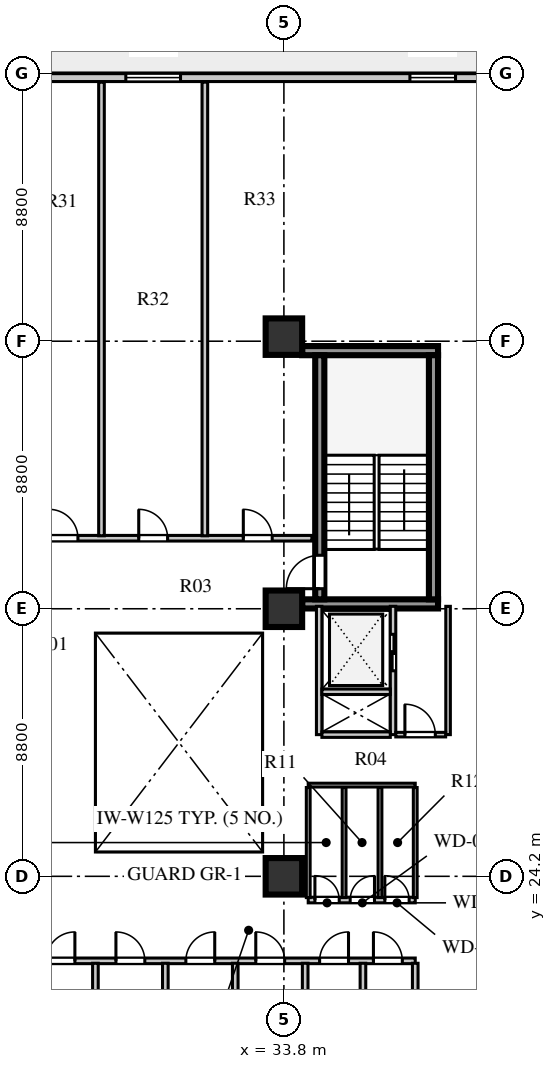
"""IFC4 building model, lengths in metres.
Left out: names, types, materials, properties, quantities, classifications, styles, units other than length and angle.
Written with IfcOpenShell. Run it as: python <this file> out.ifc"""

import sys

from ifc_helpers import new_model, si_unit, direction, frame, frame_2d, origin, origin_2d, place, context, subcontext, project, spatial, rectangle, extrude, element, fill, save


model = new_model("IFC4")
c1 = context("Model", 3, precision=1e-05, world=origin(), true_north=direction((0.0, 1.0)))
c2 = subcontext(c1, "Body", "Model", "MODEL_VIEW")
j1 = project(units=[si_unit("LENGTHUNIT", "METRE"), si_unit("PLANEANGLEUNIT", "RADIAN")], contexts=[c1])
p1 = place(None, origin())
s1 = spatial("IfcSite", under=j1, at=p1, CompositionType="ELEMENT")
p2 = place(p1, origin())
s2 = spatial("IfcBuilding", under=s1, at=p2, CompositionType="ELEMENT")
p3 = place(p2, frame((0.0, 0.0, 74.0)))
s3 = spatial("IfcBuildingStorey", under=s2, at=p3, CompositionType="ELEMENT", Elevation=74.0)
for number, where, z_axis, x_axis in (
    (1, (34.4, 33.16, 0.0), (0.0, 0.0, 1.0), (1.0, 0.0, 0.0)),
    (2, (34.4, 41.49, 0.0), (0.0, 0.0, 1.0), (1.0, 0.0, 0.0)),
):
    element("IfcWall", number, at=place(p3, frame(where, z_axis=z_axis, x_axis=x_axis)), inside=s3, PredefinedType="SHEAR", context=c2, shape_type="SweptSolid", body=[
        extrude(rectangle(XDim=4.47, YDim=0.3, at=frame_2d((2.235, 0.0))), origin(), (0.0, 0.0, 1.0), 3.72),
    ])
p4 = place(p3, frame((34.98, 33.31, 0.0), z_axis=(0.0, 0.0, 1.0), x_axis=(0.0, 1.0, 0.0)))
e3 = element("IfcWall", 3, at=p4, inside=s3, PredefinedType="SHEAR", context=c2, shape_type="SweptSolid", body=[
    extrude(rectangle(XDim=8.03, YDim=0.3, at=frame_2d((4.015, 0.0))), origin(), (0.0, 0.0, 1.0), 3.72),
])
p5 = place(p4, frame((0.35, 0.0, 0.0)))
e4 = element("IfcOpeningElement", 4, at=p5, cuts=e3, PredefinedType="OPENING", context=c2, shape_type="SweptSolid", body=[
    extrude(rectangle(XDim=1.1, YDim=2.1, at=frame_2d((0.55, 1.05))), frame((0.0, 0.16, 0.0), z_axis=(0.0, -1.0, 0.0), x_axis=(1.0, 0.0, 0.0)), (0.0, 0.0, 1.0), 0.32),
])
p6 = place(p3, frame((38.72, 33.31, 0.0), z_axis=(0.0, 0.0, 1.0), x_axis=(0.0, 1.0, 0.0)))
e5 = element("IfcWall", 5, at=p6, inside=s3, PredefinedType="SHEAR", context=c2, shape_type="SweptSolid", body=[
    extrude(rectangle(XDim=8.03, YDim=0.3, at=frame_2d((4.015, 0.0))), origin(), (0.0, 0.0, 1.0), 3.72),
])
for number, where, z_axis, x_axis in (
    (6, (33.8, 24.2, 0.0), (0.0, 0.0, 1.0), (1.0, 0.0, 0.0)),
    (7, (33.8, 33.0, 0.0), (0.0, 0.0, 1.0), (1.0, 0.0, 0.0)),
    (8, (33.8, 41.95, 0.0), (0.0, 0.0, 1.0), (1.0, 0.0, 0.0)),
):
    element("IfcColumn", number, at=place(p3, frame(where, z_axis=z_axis, x_axis=x_axis)), inside=s3, PredefinedType="COLUMN", context=c2, shape_type="SweptSolid", body=[
        extrude(rectangle(XDim=1.2, YDim=1.2, at=origin_2d()), origin(), (0.0, 0.0, 1.0), 3.72),
    ])
p7 = place(p3, frame((46.3, 50.47, 0.0), z_axis=(0.0, 0.0, 1.0), x_axis=(-1.0, 0.0, 0.0)))
e9 = element("IfcWall", 9, at=p7, inside=s3, PredefinedType="SOLIDWALL", context=c2, shape_type="SweptSolid", body=[
    extrude(rectangle(XDim=34.0, YDim=0.26, at=frame_2d((17.0, 0.0))), origin(), (0.0, 0.0, 1.0), 3.72),
])
p8 = place(p7, frame((32.05, 0.0, 0.0)))
e10 = element("IfcOpeningElement", 10, at=p8, cuts=e9, PredefinedType="OPENING", context=c2, shape_type="SweptSolid", body=[
    extrude(rectangle(XDim=1.0, YDim=2.05, at=frame_2d((0.5, 1.025))), frame((0.0, 0.14, 0.0), z_axis=(0.0, -1.0, 0.0), x_axis=(1.0, 0.0, 0.0)), (0.0, 0.0, 1.0), 0.28),
])
p9 = place(p7, frame((24.295, 0.0, 0.8)))
e11 = element("IfcOpeningElement", 11, at=p9, cuts=e9, PredefinedType="OPENING", context=c2, shape_type="SweptSolid", body=[
    extrude(rectangle(XDim=2.25, YDim=2.0, at=frame_2d((1.125, 1.0))), frame((0.0, 0.14, 0.0), z_axis=(0.0, -1.0, 0.0), x_axis=(1.0, 0.0, 0.0)), (0.0, 0.0, 1.0), 0.28),
])
p10 = place(p7, frame((15.9, 0.0, 0.8)))
e12 = element("IfcOpeningElement", 12, at=p10, cuts=e9, PredefinedType="OPENING", context=c2, shape_type="SweptSolid", body=[
    extrude(rectangle(XDim=1.8, YDim=2.0, at=frame_2d((0.9, 1.0))), frame((0.0, 0.14, 0.0), z_axis=(0.0, -1.0, 0.0), x_axis=(1.0, 0.0, 0.0)), (0.0, 0.0, 1.0), 0.28),
])
p11 = place(p7, frame((6.855, 0.0, 0.8)))
e13 = element("IfcOpeningElement", 13, at=p11, cuts=e9, PredefinedType="OPENING", context=c2, shape_type="SweptSolid", body=[
    extrude(rectangle(XDim=1.5, YDim=2.0, at=frame_2d((0.75, 1.0))), frame((0.0, 0.14, 0.0), z_axis=(0.0, -1.0, 0.0), x_axis=(1.0, 0.0, 0.0)), (0.0, 0.0, 1.0), 0.28),
])
p12 = place(p3, frame((34.96, 28.86, 0.0), z_axis=(0.0, 0.0, 1.0), x_axis=(0.0, 1.0, 0.0)))
e14 = element("IfcWall", 14, at=p12, inside=s3, PredefinedType="SOLIDWALL", context=c2, shape_type="SweptSolid", body=[
    extrude(rectangle(XDim=4.22, YDim=0.18, at=frame_2d((2.11, 0.0))), origin(), (0.0, 0.0, 1.0), 3.72),
])
p13 = place(p3, frame((37.39, 28.86, 0.0), z_axis=(0.0, 0.0, 1.0), x_axis=(0.0, 1.0, 0.0)))
e15 = element("IfcWall", 15, at=p13, inside=s3, PredefinedType="SOLIDWALL", context=c2, shape_type="SweptSolid", body=[
    extrude(rectangle(XDim=4.22, YDim=0.18, at=frame_2d((2.11, 0.0))), origin(), (0.0, 0.0, 1.0), 3.72),
])
p14 = place(p13, frame((2.1, 0.0, 0.0)))
e16 = element("IfcOpeningElement", 16, at=p14, cuts=e15, PredefinedType="OPENING", context=c2, shape_type="SweptSolid", body=[
    extrude(rectangle(XDim=1.2, YDim=2.12, at=frame_2d((0.6, 1.06))), frame((0.0, 0.1, 0.0), z_axis=(0.0, -1.0, 0.0), x_axis=(1.0, 0.0, 0.0)), (0.0, 0.0, 1.0), 0.2),
])
for number, where, z_axis, x_axis in (
    (17, (35.05, 28.86, 0.0), (0.0, 0.0, 1.0), (1.0, 0.0, 0.0)),
    (18, (35.05, 30.27, 0.0), (0.0, 0.0, 1.0), (1.0, 0.0, 0.0)),
):
    element("IfcWall", number, at=place(p3, frame(where, z_axis=z_axis, x_axis=x_axis)), inside=s3, PredefinedType="SOLIDWALL", context=c2, shape_type="SweptSolid", body=[
        extrude(rectangle(XDim=2.25, YDim=0.18, at=frame_2d((1.125, 0.0))), origin(), (0.0, 0.0, 1.0), 3.72),
    ])
p15 = place(p3, frame((39.2, 28.86, 0.0), z_axis=(0.0, 0.0, 1.0), x_axis=(0.0, 1.0, 0.0)))
e19 = element("IfcWall", 19, at=p15, inside=s3, PredefinedType="PARTITIONING", context=c2, shape_type="SweptSolid", body=[
    extrude(rectangle(XDim=4.22, YDim=0.15, at=frame_2d((2.11, 0.0))), origin(), (0.0, 0.0, 1.0), 3.72),
])
p16 = place(p3, frame((37.48, 28.86, 0.0), z_axis=(0.0, 0.0, 1.0), x_axis=(1.0, 0.0, 0.0)))
e20 = element("IfcWall", 20, at=p16, inside=s3, PredefinedType="PARTITIONING", context=c2, shape_type="SweptSolid", body=[
    extrude(rectangle(XDim=1.64, YDim=0.15, at=frame_2d((0.82, 0.0))), origin(), (0.0, 0.0, 1.0), 3.72),
])
p17 = place(p16, frame((0.3, 0.0, 0.0)))
e21 = element("IfcOpeningElement", 21, at=p17, cuts=e20, PredefinedType="OPENING", context=c2, shape_type="SweptSolid", body=[
    extrude(rectangle(XDim=1.0, YDim=2.1, at=frame_2d((0.5, 1.05))), frame((0.0, 0.085, 0.0), z_axis=(0.0, -1.0, 0.0), x_axis=(1.0, 0.0, 0.0)), (0.0, 0.0, 1.0), 0.17),
])
p18 = place(p3, frame((25.25, 21.42, 0.0), z_axis=(0.0, 0.0, 1.0), x_axis=(1.0, 0.0, 0.0)))
e22 = element("IfcWall", 22, at=p18, inside=s3, PredefinedType="SOLIDWALL", context=c2, shape_type="SweptSolid", body=[
    extrude(rectangle(XDim=12.87, YDim=0.185, at=frame_2d((6.435, 0.0))), origin(), (0.0, 0.0, 1.0), 3.32),
])
p19 = place(p18, frame((0.725, 0.0, 0.0)))
e23 = element("IfcOpeningElement", 23, at=p19, cuts=e22, PredefinedType="OPENING", context=c2, shape_type="SweptSolid", body=[
    extrude(rectangle(XDim=0.95, YDim=2.08, at=frame_2d((0.475, 1.04))), frame((0.0, 0.103, 0.0), z_axis=(0.0, -1.0, 0.0), x_axis=(1.0, 0.0, 0.0)), (0.0, 0.0, 1.0), 0.205),
])
p20 = place(p18, frame((3.025, 0.0, 0.0)))
e24 = element("IfcOpeningElement", 24, at=p20, cuts=e22, PredefinedType="OPENING", context=c2, shape_type="SweptSolid", body=[
    extrude(rectangle(XDim=0.95, YDim=2.08, at=frame_2d((0.475, 1.04))), frame((0.0, 0.103, 0.0), z_axis=(0.0, -1.0, 0.0), x_axis=(1.0, 0.0, 0.0)), (0.0, 0.0, 1.0), 0.205),
])
p21 = place(p18, frame((5.325, 0.0, 0.0)))
e25 = element("IfcOpeningElement", 25, at=p21, cuts=e22, PredefinedType="OPENING", context=c2, shape_type="SweptSolid", body=[
    extrude(rectangle(XDim=0.95, YDim=2.08, at=frame_2d((0.475, 1.04))), frame((0.0, 0.103, 0.0), z_axis=(0.0, -1.0, 0.0), x_axis=(1.0, 0.0, 0.0)), (0.0, 0.0, 1.0), 0.205),
])
p22 = place(p18, frame((7.625, 0.0, 0.0)))
e26 = element("IfcOpeningElement", 26, at=p22, cuts=e22, PredefinedType="OPENING", context=c2, shape_type="SweptSolid", body=[
    extrude(rectangle(XDim=0.95, YDim=2.08, at=frame_2d((0.475, 1.04))), frame((0.0, 0.103, 0.0), z_axis=(0.0, -1.0, 0.0), x_axis=(1.0, 0.0, 0.0)), (0.0, 0.0, 1.0), 0.205),
])
p23 = place(p18, frame((9.725, 0.0, 0.0)))
e27 = element("IfcOpeningElement", 27, at=p23, cuts=e22, PredefinedType="OPENING", context=c2, shape_type="SweptSolid", body=[
    extrude(rectangle(XDim=0.95, YDim=2.08, at=frame_2d((0.475, 1.04))), frame((0.0, 0.103, 0.0), z_axis=(0.0, -1.0, 0.0), x_axis=(1.0, 0.0, 0.0)), (0.0, 0.0, 1.0), 0.205),
])
p24 = place(p18, frame((11.495, 0.0, 0.0)))
e28 = element("IfcOpeningElement", 28, at=p24, cuts=e22, PredefinedType="OPENING", context=c2, shape_type="SweptSolid", body=[
    extrude(rectangle(XDim=0.95, YDim=2.08, at=frame_2d((0.475, 1.04))), frame((0.0, 0.103, 0.0), z_axis=(0.0, -1.0, 0.0), x_axis=(1.0, 0.0, 0.0)), (0.0, 0.0, 1.0), 0.205),
])
p25 = place(p3, frame((38.12, 6.88, 0.0), z_axis=(0.0, 0.0, 1.0), x_axis=(0.0, 1.0, 0.0)))
e29 = element("IfcWall", 29, at=p25, inside=s3, PredefinedType="SOLIDWALL", context=c2, shape_type="SweptSolid", body=[
    extrude(rectangle(XDim=14.46, YDim=0.185, at=frame_2d((7.23, 0.0))), origin(), (0.0, 0.0, 1.0), 3.72),
])
p26 = place(p3, frame((34.6, 23.42, 0.0), z_axis=(0.0, 0.0, 1.0), x_axis=(1.0, 0.0, 0.0)))
e30 = element("IfcWall", 30, at=p26, inside=s3, PredefinedType="SOLIDWALL", context=c2, shape_type="SweptSolid", body=[
    extrude(rectangle(XDim=3.52, YDim=0.185, at=frame_2d((1.76, 0.0))), origin(), (0.0, 0.0, 1.0), 3.72),
])
p27 = place(p26, frame((0.22, 0.0, 0.0)))
e31 = element("IfcOpeningElement", 31, at=p27, cuts=e30, PredefinedType="OPENING", context=c2, shape_type="SweptSolid", body=[
    extrude(rectangle(XDim=0.8, YDim=2.05, at=frame_2d((0.4, 1.025))), frame((0.0, 0.103, 0.0), z_axis=(0.0, -1.0, 0.0), x_axis=(1.0, 0.0, 0.0)), (0.0, 0.0, 1.0), 0.205),
])
p28 = place(p26, frame((1.38, 0.0, 0.0)))
e32 = element("IfcOpeningElement", 32, at=p28, cuts=e30, PredefinedType="OPENING", context=c2, shape_type="SweptSolid", body=[
    extrude(rectangle(XDim=0.8, YDim=2.05, at=frame_2d((0.4, 1.025))), frame((0.0, 0.103, 0.0), z_axis=(0.0, -1.0, 0.0), x_axis=(1.0, 0.0, 0.0)), (0.0, 0.0, 1.0), 0.205),
])
p29 = place(p26, frame((2.52, 0.0, 0.0)))
e33 = element("IfcOpeningElement", 33, at=p29, cuts=e30, PredefinedType="OPENING", context=c2, shape_type="SweptSolid", body=[
    extrude(rectangle(XDim=0.8, YDim=2.05, at=frame_2d((0.4, 1.025))), frame((0.0, 0.103, 0.0), z_axis=(0.0, -1.0, 0.0), x_axis=(1.0, 0.0, 0.0)), (0.0, 0.0, 1.0), 0.205),
])
p30 = place(p3, frame((25.25, 35.32, 0.0), z_axis=(0.0, 0.0, 1.0), x_axis=(1.0, 0.0, 0.0)))
e34 = element("IfcWall", 34, at=p30, inside=s3, PredefinedType="SOLIDWALL", context=c2, shape_type="SweptSolid", body=[
    extrude(rectangle(XDim=9.47, YDim=0.185, at=frame_2d((4.735, 0.0))), origin(), (0.0, 0.0, 1.0), 3.72),
])
p31 = place(p30, frame((0.825, 0.0, 0.0)))
e35 = element("IfcOpeningElement", 35, at=p31, cuts=e34, PredefinedType="OPENING", context=c2, shape_type="SweptSolid", body=[
    extrude(rectangle(XDim=0.95, YDim=2.08, at=frame_2d((0.475, 1.04))), frame((0.0, 0.103, 0.0), z_axis=(0.0, -1.0, 0.0), x_axis=(1.0, 0.0, 0.0)), (0.0, 0.0, 1.0), 0.205),
])
p32 = place(p30, frame((3.775, 0.0, 0.0)))
e36 = element("IfcOpeningElement", 36, at=p32, cuts=e34, PredefinedType="OPENING", context=c2, shape_type="SweptSolid", body=[
    extrude(rectangle(XDim=0.95, YDim=2.08, at=frame_2d((0.475, 1.04))), frame((0.0, 0.103, 0.0), z_axis=(0.0, -1.0, 0.0), x_axis=(1.0, 0.0, 0.0)), (0.0, 0.0, 1.0), 0.205),
])
p33 = place(p30, frame((7.215, 0.0, 0.0)))
e37 = element("IfcOpeningElement", 37, at=p33, cuts=e34, PredefinedType="OPENING", context=c2, shape_type="SweptSolid", body=[
    extrude(rectangle(XDim=0.95, YDim=2.08, at=frame_2d((0.475, 1.04))), frame((0.0, 0.103, 0.0), z_axis=(0.0, -1.0, 0.0), x_axis=(1.0, 0.0, 0.0)), (0.0, 0.0, 1.0), 0.205),
])
p34 = place(p3, frame((34.6, 27.2, 0.0), z_axis=(0.0, 0.0, 1.0), x_axis=(1.0, 0.0, 0.0)))
e38 = element("IfcWall", 38, at=p34, inside=s3, PredefinedType="PLUMBINGWALL", context=c2, shape_type="SweptSolid", body=[
    extrude(rectangle(XDim=3.52, YDim=0.125, at=frame_2d((1.76, 0.0))), origin(), (0.0, 0.0, 1.0), 3.32),
])
for number, where, z_axis, x_axis in (
    (39, (34.6, 23.5, 0.0), (0.0, 0.0, 1.0), (0.0, 1.0, 0.0)),
    (40, (38.12, 23.5, 0.0), (0.0, 0.0, 1.0), (0.0, 1.0, 0.0)),
    (41, (35.78, 23.5, 0.0), (0.0, 0.0, 1.0), (0.0, 1.0, 0.0)),
    (42, (36.96, 23.5, 0.0), (0.0, 0.0, 1.0), (0.0, 1.0, 0.0)),
):
    element("IfcWall", number, at=place(p3, frame(where, z_axis=z_axis, x_axis=x_axis)), inside=s3, PredefinedType="PLUMBINGWALL", context=c2, shape_type="SweptSolid", body=[
        extrude(rectangle(XDim=3.62, YDim=0.125, at=frame_2d((1.81, 0.0))), origin(), (0.0, 0.0, 1.0), 3.72),
    ])
for number, where, z_axis, x_axis in (
    (43, (27.6, 6.88, 0.0), (0.0, 0.0, 1.0), (0.0, 1.0, 0.0)),
    (44, (29.9, 6.88, 0.0), (0.0, 0.0, 1.0), (0.0, 1.0, 0.0)),
    (45, (32.2, 6.88, 0.0), (0.0, 0.0, 1.0), (0.0, 1.0, 0.0)),
    (46, (34.5, 6.88, 0.0), (0.0, 0.0, 1.0), (0.0, 1.0, 0.0)),
    (47, (36.4, 6.88, 0.0), (0.0, 0.0, 1.0), (0.0, 1.0, 0.0)),
):
    element("IfcWall", number, at=place(p3, frame(where, z_axis=z_axis, x_axis=x_axis)), inside=s3, PredefinedType="SOLIDWALL", context=c2, shape_type="SweptSolid", body=[
        extrude(rectangle(XDim=14.46, YDim=0.185, at=frame_2d((7.23, 0.0))), origin(), (0.0, 0.0, 1.0), 3.72),
    ])
for number, where, z_axis, x_axis in (
    (48, (27.8, 35.4, 0.0), (0.0, 0.0, 1.0), (0.0, 1.0, 0.0)),
    (49, (31.2, 35.4, 0.0), (0.0, 0.0, 1.0), (0.0, 1.0, 0.0)),
):
    element("IfcWall", number, at=place(p3, frame(where, z_axis=z_axis, x_axis=x_axis)), inside=s3, PredefinedType="SOLIDWALL", context=c2, shape_type="SweptSolid", body=[
        extrude(rectangle(XDim=14.92, YDim=0.185, at=frame_2d((7.46, 0.0))), origin(), (0.0, 0.0, 1.0), 3.72),
    ])
p35 = place(p10, origin())
e50 = element("IfcWindow", 50, at=p35, inside=s3, PartitioningType="SINGLE_PANEL", PredefinedType="WINDOW", context=c2, shape_type="SweptSolid", body=[
    extrude(rectangle(XDim=1.8, YDim=2.0, at=frame_2d((0.9, 1.0))), frame((0.0, 0.03, 0.0), z_axis=(0.0, -1.0, 0.0), x_axis=(1.0, 0.0, 0.0)), (0.0, 0.0, 1.0), 0.06),
])
fill(e12, e50)
p36 = place(p11, origin())
e51 = element("IfcWindow", 51, at=p36, inside=s3, PartitioningType="SINGLE_PANEL", PredefinedType="WINDOW", context=c2, shape_type="SweptSolid", body=[
    extrude(rectangle(XDim=1.5, YDim=2.0, at=frame_2d((0.75, 1.0))), frame((0.0, 0.03, 0.0), z_axis=(0.0, -1.0, 0.0), x_axis=(1.0, 0.0, 0.0)), (0.0, 0.0, 1.0), 0.06),
])
fill(e13, e51)
p37 = place(p5, origin())
e52 = element("IfcDoor", 52, at=p37, inside=s3, OperationType="SINGLE_SWING_LEFT", PredefinedType="DOOR", context=c2, shape_type="SweptSolid", body=[
    extrude(rectangle(XDim=1.1, YDim=2.1, at=frame_2d((0.55, 1.05))), frame((0.0, 0.025, 0.0), z_axis=(0.0, -1.0, 0.0), x_axis=(1.0, 0.0, 0.0)), (0.0, 0.0, 1.0), 0.05),
])
fill(e4, e52)
p38 = place(p14, frame((1.2, 0.0, 0.0), z_axis=(0.0, 0.0, 1.0), x_axis=(-1.0, 0.0, 0.0)))
e53 = element("IfcDoor", 53, at=p38, inside=s3, OperationType="DOUBLE_DOOR_SLIDING", PredefinedType="DOOR", context=c2, shape_type="SweptSolid", body=[
    extrude(rectangle(XDim=1.2, YDim=2.12, at=frame_2d((0.6, 1.06))), frame((0.0, 0.025, 0.0), z_axis=(0.0, -1.0, 0.0), x_axis=(1.0, 0.0, 0.0)), (0.0, 0.0, 1.0), 0.05),
])
fill(e16, e53)
p39 = place(p17, origin())
e54 = element("IfcDoor", 54, at=p39, inside=s3, OperationType="SINGLE_SWING_LEFT", PredefinedType="DOOR", context=c2, shape_type="SweptSolid", body=[
    extrude(rectangle(XDim=1.0, YDim=2.1, at=frame_2d((0.5, 1.05))), frame((0.0, 0.025, 0.0), z_axis=(0.0, -1.0, 0.0), x_axis=(1.0, 0.0, 0.0)), (0.0, 0.0, 1.0), 0.05),
])
fill(e21, e54)
p40 = place(p27, origin())
e55 = element("IfcDoor", 55, at=p40, inside=s3, OperationType="SINGLE_SWING_LEFT", PredefinedType="DOOR", context=c2, shape_type="SweptSolid", body=[
    extrude(rectangle(XDim=0.8, YDim=2.05, at=frame_2d((0.4, 1.025))), frame((0.0, 0.025, 0.0), z_axis=(0.0, -1.0, 0.0), x_axis=(1.0, 0.0, 0.0)), (0.0, 0.0, 1.0), 0.05),
])
fill(e31, e55)
p41 = place(p28, origin())
e56 = element("IfcDoor", 56, at=p41, inside=s3, OperationType="SINGLE_SWING_RIGHT", PredefinedType="DOOR", context=c2, shape_type="SweptSolid", body=[
    extrude(rectangle(XDim=0.8, YDim=2.05, at=frame_2d((0.4, 1.025))), frame((0.0, 0.025, 0.0), z_axis=(0.0, -1.0, 0.0), x_axis=(1.0, 0.0, 0.0)), (0.0, 0.0, 1.0), 0.05),
])
fill(e32, e56)
p42 = place(p29, origin())
e57 = element("IfcDoor", 57, at=p42, inside=s3, OperationType="SINGLE_SWING_LEFT", PredefinedType="DOOR", context=c2, shape_type="SweptSolid", body=[
    extrude(rectangle(XDim=0.8, YDim=2.05, at=frame_2d((0.4, 1.025))), frame((0.0, 0.025, 0.0), z_axis=(0.0, -1.0, 0.0), x_axis=(1.0, 0.0, 0.0)), (0.0, 0.0, 1.0), 0.05),
])
fill(e33, e57)
p43 = place(p19, frame((0.95, 0.0, 0.0), z_axis=(0.0, 0.0, 1.0), x_axis=(-1.0, 0.0, 0.0)))
e58 = element("IfcDoor", 58, at=p43, inside=s3, OperationType="SINGLE_SWING_LEFT", PredefinedType="DOOR", context=c2, shape_type="SweptSolid", body=[
    extrude(rectangle(XDim=0.95, YDim=2.08, at=frame_2d((0.475, 1.04))), frame((0.0, 0.025, 0.0), z_axis=(0.0, -1.0, 0.0), x_axis=(1.0, 0.0, 0.0)), (0.0, 0.0, 1.0), 0.05),
])
fill(e23, e58)
p44 = place(p20, frame((0.95, 0.0, 0.0), z_axis=(0.0, 0.0, 1.0), x_axis=(-1.0, 0.0, 0.0)))
e59 = element("IfcDoor", 59, at=p44, inside=s3, OperationType="SINGLE_SWING_RIGHT", PredefinedType="DOOR", context=c2, shape_type="SweptSolid", body=[
    extrude(rectangle(XDim=0.95, YDim=2.08, at=frame_2d((0.475, 1.04))), frame((0.0, 0.025, 0.0), z_axis=(0.0, -1.0, 0.0), x_axis=(1.0, 0.0, 0.0)), (0.0, 0.0, 1.0), 0.05),
])
fill(e24, e59)
p45 = place(p21, frame((0.95, 0.0, 0.0), z_axis=(0.0, 0.0, 1.0), x_axis=(-1.0, 0.0, 0.0)))
e60 = element("IfcDoor", 60, at=p45, inside=s3, OperationType="SINGLE_SWING_LEFT", PredefinedType="DOOR", context=c2, shape_type="SweptSolid", body=[
    extrude(rectangle(XDim=0.95, YDim=2.08, at=frame_2d((0.475, 1.04))), frame((0.0, 0.025, 0.0), z_axis=(0.0, -1.0, 0.0), x_axis=(1.0, 0.0, 0.0)), (0.0, 0.0, 1.0), 0.05),
])
fill(e25, e60)
p46 = place(p22, frame((0.95, 0.0, 0.0), z_axis=(0.0, 0.0, 1.0), x_axis=(-1.0, 0.0, 0.0)))
e61 = element("IfcDoor", 61, at=p46, inside=s3, OperationType="SINGLE_SWING_RIGHT", PredefinedType="DOOR", context=c2, shape_type="SweptSolid", body=[
    extrude(rectangle(XDim=0.95, YDim=2.08, at=frame_2d((0.475, 1.04))), frame((0.0, 0.025, 0.0), z_axis=(0.0, -1.0, 0.0), x_axis=(1.0, 0.0, 0.0)), (0.0, 0.0, 1.0), 0.05),
])
fill(e26, e61)
p47 = place(p23, frame((0.95, 0.0, 0.0), z_axis=(0.0, 0.0, 1.0), x_axis=(-1.0, 0.0, 0.0)))
e62 = element("IfcDoor", 62, at=p47, inside=s3, OperationType="SINGLE_SWING_LEFT", PredefinedType="DOOR", context=c2, shape_type="SweptSolid", body=[
    extrude(rectangle(XDim=0.95, YDim=2.08, at=frame_2d((0.475, 1.04))), frame((0.0, 0.025, 0.0), z_axis=(0.0, -1.0, 0.0), x_axis=(1.0, 0.0, 0.0)), (0.0, 0.0, 1.0), 0.05),
])
fill(e27, e62)
p48 = place(p24, frame((0.95, 0.0, 0.0), z_axis=(0.0, 0.0, 1.0), x_axis=(-1.0, 0.0, 0.0)))
e63 = element("IfcDoor", 63, at=p48, inside=s3, OperationType="SINGLE_SWING_RIGHT", PredefinedType="DOOR", context=c2, shape_type="SweptSolid", body=[
    extrude(rectangle(XDim=0.95, YDim=2.08, at=frame_2d((0.475, 1.04))), frame((0.0, 0.025, 0.0), z_axis=(0.0, -1.0, 0.0), x_axis=(1.0, 0.0, 0.0)), (0.0, 0.0, 1.0), 0.05),
])
fill(e28, e63)
p49 = place(p31, origin())
e64 = element("IfcDoor", 64, at=p49, inside=s3, OperationType="SINGLE_SWING_LEFT", PredefinedType="DOOR", context=c2, shape_type="SweptSolid", body=[
    extrude(rectangle(XDim=0.95, YDim=2.08, at=frame_2d((0.475, 1.04))), frame((0.0, 0.025, 0.0), z_axis=(0.0, -1.0, 0.0), x_axis=(1.0, 0.0, 0.0)), (0.0, 0.0, 1.0), 0.05),
])
fill(e35, e64)
p50 = place(p32, origin())
e65 = element("IfcDoor", 65, at=p50, inside=s3, OperationType="SINGLE_SWING_LEFT", PredefinedType="DOOR", context=c2, shape_type="SweptSolid", body=[
    extrude(rectangle(XDim=0.95, YDim=2.08, at=frame_2d((0.475, 1.04))), frame((0.0, 0.025, 0.0), z_axis=(0.0, -1.0, 0.0), x_axis=(1.0, 0.0, 0.0)), (0.0, 0.0, 1.0), 0.05),
])
fill(e36, e65)
p51 = place(p33, origin())
e66 = element("IfcDoor", 66, at=p51, inside=s3, OperationType="SINGLE_SWING_LEFT", PredefinedType="DOOR", context=c2, shape_type="SweptSolid", body=[
    extrude(rectangle(XDim=0.95, YDim=2.08, at=frame_2d((0.475, 1.04))), frame((0.0, 0.025, 0.0), z_axis=(0.0, -1.0, 0.0), x_axis=(1.0, 0.0, 0.0)), (0.0, 0.0, 1.0), 0.05),
])
fill(e37, e66)
save(model, sys.argv[1])
